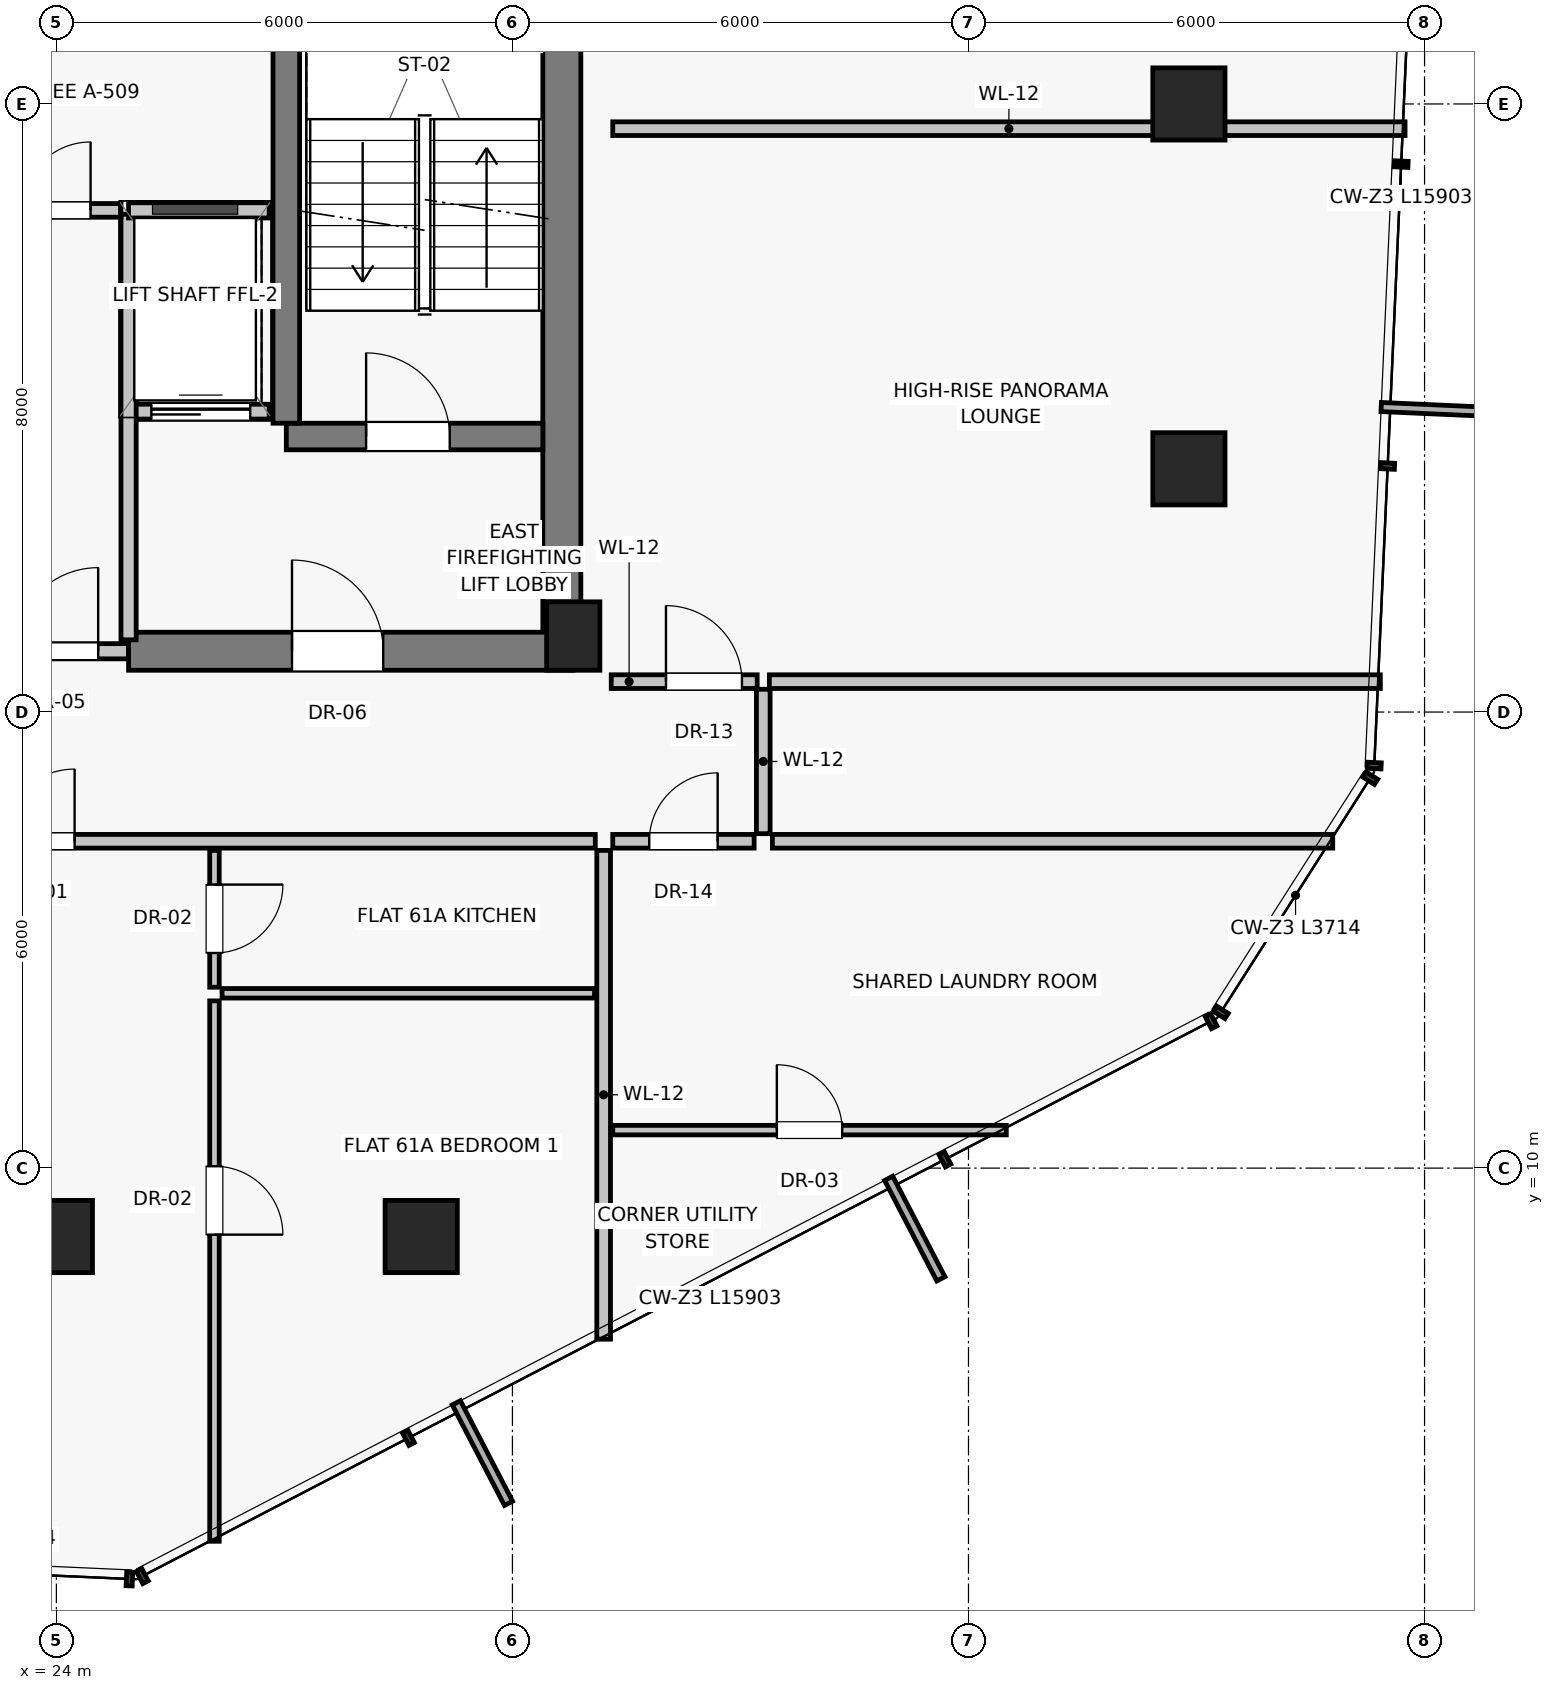
"""IFC4 building model, lengths in metres.
Left out: names, types, materials, properties, quantities, classifications, styles, units other than length and angle.
Written with IfcOpenShell. Run it as: python <this file> out.ifc"""

import sys

from ifc_helpers import new_model, si_unit, direction, frame, frame_2d, origin, origin_2d, place, context, subcontext, project, spatial, rectangle, extrude, source, transform, mapped, element, fill, save


model = new_model("IFC4")
c1 = context("Model", 3, precision=1e-05, world=origin(), true_north=direction((0.0, 1.0)))
c2 = subcontext(c1, "Body", "Model", "MODEL_VIEW")
j1 = project(units=[si_unit("LENGTHUNIT", "METRE"), si_unit("PLANEANGLEUNIT", "RADIAN")], contexts=[c1])
p1 = place(None, origin())
s1 = spatial("IfcSite", under=j1, at=p1, CompositionType="ELEMENT")
p2 = place(p1, origin())
s2 = spatial("IfcBuilding", under=s1, at=p2, CompositionType="ELEMENT")
p3 = place(p2, frame((0.0, 0.0, 215.65)))
s3 = spatial("IfcBuildingStorey", under=s2, at=p3, CompositionType="ELEMENT", Elevation=215.65)
p4 = place(p3, frame((30.8, 17.0, 0.0), z_axis=(0.0, 0.0, 1.0), x_axis=(1.0, 0.0, 0.0)))
e1 = element("IfcColumn", 1, at=p4, inside=s3, PredefinedType="PILASTER", context=c2, shape_type="SweptSolid", body=[
    extrude(rectangle(XDim=0.7, YDim=0.9, at=origin_2d()), origin(), (0.0, 0.0, 1.0), 3.25),
])
for number, where, z_axis, x_axis in (
    (2, (38.9, 19.2, 0.0), (0.0, 0.0, 1.0), (1.0, 0.0, 0.0)),
    (3, (38.9, 24.0, 0.0), (0.0, 0.0, 1.0), (1.0, 0.0, 0.0)),
    (4, (24.0, 9.1, 0.0), (0.0, 0.0, 1.0), (1.0, 0.0, 0.0)),
    (5, (28.8, 9.1, 0.0), (0.0, 0.0, 1.0), (1.0, 0.0, 0.0)),
):
    element("IfcColumn", number, at=place(p3, frame(where, z_axis=z_axis, x_axis=x_axis)), inside=s3, PredefinedType="COLUMN", context=c2, shape_type="SweptSolid", body=[
        extrude(rectangle(XDim=0.95, YDim=0.95, at=origin_2d()), origin(), (0.0, 0.0, 1.0), 3.25),
    ])
p5 = place(p3, frame((30.65, 16.8, 0.0), z_axis=(0.0, 0.0, 1.0), x_axis=(0.0, 1.0, 0.0)))
e6 = element("IfcWall", 6, at=p5, inside=s3, PredefinedType="SHEAR", context=c2, shape_type="SweptSolid", body=[
    extrude(rectangle(XDim=14.2, YDim=0.5, at=frame_2d((7.1, 0.0))), origin(), (0.0, 0.0, 1.0), 3.015),
])
p6 = place(p3, frame((23.05, 16.8, 0.0), z_axis=(0.0, 0.0, 1.0), x_axis=(1.0, 0.0, 0.0)))
e7 = element("IfcWall", 7, at=p6, inside=s3, PredefinedType="SOLIDWALL", context=c2, shape_type="SweptSolid", body=[
    extrude(rectangle(XDim=1.9, YDim=0.2, at=frame_2d((0.95, 0.0))), origin(), (0.0, 0.0, 1.0), 2.165),
])
p7 = place(p6, frame((0.4, 0.0, 0.0)))
e8 = element("IfcOpeningElement", 8, at=p7, cuts=e7, PredefinedType="OPENING", context=c2, shape_type="SweptSolid", body=[
    extrude(rectangle(XDim=1.1, YDim=2.03, at=frame_2d((0.55, 1.015))), frame((0.0, 0.11, 0.0), z_axis=(0.0, -1.0, 0.0), x_axis=(1.0, 0.0, 0.0)), (0.0, 0.0, 1.0), 0.22),
])
p8 = place(p3, frame((24.95, 16.8, 0.0), z_axis=(0.0, 0.0, 1.0), x_axis=(1.0, 0.0, 0.0)))
e9 = element("IfcWall", 9, at=p8, inside=s3, PredefinedType="SHEAR", context=c2, shape_type="SweptSolid", body=[
    extrude(rectangle(XDim=5.85, YDim=0.5, at=frame_2d((2.925, 0.0))), origin(), (0.0, 0.0, 1.0), 3.015),
])
p9 = place(p8, frame((2.15, 0.0, 0.0)))
e10 = element("IfcOpeningElement", 10, at=p9, cuts=e9, PredefinedType="OPENING", context=c2, shape_type="SweptSolid", body=[
    extrude(rectangle(XDim=1.2, YDim=2.03, at=frame_2d((0.6, 1.015))), frame((0.0, 0.26, 0.0), z_axis=(0.0, -1.0, 0.0), x_axis=(1.0, 0.0, 0.0)), (0.0, 0.0, 1.0), 0.52),
])
p10 = place(p3, frame((24.95, 19.95, 0.0), z_axis=(0.0, 0.0, 1.0), x_axis=(1.0, 0.0, 0.0)))
e11 = element("IfcWall", 11, at=p10, inside=s3, PredefinedType="SOLIDWALL", context=c2, shape_type="SweptSolid", body=[
    extrude(rectangle(XDim=1.85, YDim=0.2, at=frame_2d((0.925, 0.0))), origin(), (0.0, 0.0, 1.0), 3.015),
])
p11 = place(p10, frame((0.3, 0.0, 0.0)))
e12 = element("IfcOpeningElement", 12, at=p11, cuts=e11, PredefinedType="OPENING", context=c2, shape_type="SweptSolid", body=[
    extrude(rectangle(XDim=1.3, YDim=2.25, at=frame_2d((0.65, 1.125))), frame((0.0, 0.11, 0.0), z_axis=(0.0, -1.0, 0.0), x_axis=(1.0, 0.0, 0.0)), (0.0, 0.0, 1.0), 0.22),
])
p12 = place(p3, frame((27.025, 19.625, 0.0), z_axis=(0.0, 0.0, 1.0), x_axis=(1.0, 0.0, 0.0)))
e13 = element("IfcWall", 13, at=p12, inside=s3, PredefinedType="SHEAR", context=c2, shape_type="SweptSolid", body=[
    extrude(rectangle(XDim=3.375, YDim=0.35, at=frame_2d((1.688, 0.0))), origin(), (0.0, 0.0, 1.0), 3.015),
])
p13 = place(p12, frame((1.05, 0.0, 0.0)))
e14 = element("IfcOpeningElement", 14, at=p13, cuts=e13, PredefinedType="OPENING", context=c2, shape_type="SweptSolid", body=[
    extrude(rectangle(XDim=1.1, YDim=2.03, at=frame_2d((0.55, 1.015))), frame((0.0, 0.185, 0.0), z_axis=(0.0, -1.0, 0.0), x_axis=(1.0, 0.0, 0.0)), (0.0, 0.0, 1.0), 0.37),
])
p14 = place(p3, frame((27.025, 19.8, 0.0), z_axis=(0.0, 0.0, 1.0), x_axis=(0.0, 1.0, 0.0)))
e15 = element("IfcWall", 15, at=p14, inside=s3, PredefinedType="SHEAR", context=c2, shape_type="SweptSolid", body=[
    extrude(rectangle(XDim=8.775, YDim=0.35, at=frame_2d((4.387, 0.0))), origin(), (0.0, 0.0, 1.0), 3.015),
])
p15 = place(p3, frame((24.95, 16.95, 0.0), z_axis=(0.0, 0.0, 1.0), x_axis=(0.0, 1.0, 0.0)))
e16 = element("IfcWall", 16, at=p15, inside=s3, PredefinedType="SOLIDWALL", context=c2, shape_type="SweptSolid", body=[
    extrude(rectangle(XDim=5.6, YDim=0.2, at=frame_2d((2.8, 0.0))), origin(), (0.0, 0.0, 1.0), 3.015),
])
p16 = place(p3, frame((24.95, 22.6, 0.0), z_axis=(0.0, 0.0, 1.0), x_axis=(1.0, 0.0, 0.0)))
e17 = element("IfcWall", 17, at=p16, inside=s3, PredefinedType="SOLIDWALL", context=c2, shape_type="SweptSolid", body=[
    extrude(rectangle(XDim=1.85, YDim=0.2, at=frame_2d((0.925, 0.0))), origin(), (0.0, 0.0, 1.0), 3.015),
])
p17 = place(p3, frame((23.15, 22.6, 0.0), z_axis=(0.0, 0.0, 1.0), x_axis=(1.0, 0.0, 0.0)))
e18 = element("IfcWall", 18, at=p17, inside=s3, PredefinedType="PARTITIONING", context=c2, shape_type="SweptSolid", body=[
    extrude(rectangle(XDim=1.7, YDim=0.18, at=frame_2d((0.85, 0.0))), origin(), (0.0, 0.0, 1.0), 3.015),
])
p18 = place(p17, frame((0.4, 0.0, 0.0)))
e19 = element("IfcOpeningElement", 19, at=p18, cuts=e18, PredefinedType="OPENING", context=c2, shape_type="SweptSolid", body=[
    extrude(rectangle(XDim=0.9, YDim=2.01, at=frame_2d((0.45, 1.005))), frame((0.0, 0.1, 0.0), z_axis=(0.0, -1.0, 0.0), x_axis=(1.0, 0.0, 0.0)), (0.0, 0.0, 1.0), 0.2),
])
p19 = place(p3, frame((31.2, 14.18, 0.0), z_axis=(0.0, 0.0, 1.0), x_axis=(0.0, -1.0, 0.0)))
e20 = element("IfcWall", 20, at=p19, inside=s3, PredefinedType="PARTITIONING", context=c2, shape_type="SweptSolid", body=[
    extrude(rectangle(XDim=6.43, YDim=0.18, at=frame_2d((3.215, 0.0))), origin(), (0.0, 0.0, 1.0), 3.015),
])
p20 = place(p3, frame((19.31, 14.3, 0.0), z_axis=(0.0, 0.0, 1.0), x_axis=(1.0, 0.0, 0.0)))
e21 = element("IfcWall", 21, at=p20, inside=s3, PredefinedType="PARTITIONING", context=c2, shape_type="SweptSolid", body=[
    extrude(rectangle(XDim=11.78, YDim=0.18, at=frame_2d((5.89, 0.0))), origin(), (0.0, 0.0, 1.0), 3.015),
])
p21 = place(p20, frame((3.98, 0.0, 0.0)))
e22 = element("IfcOpeningElement", 22, at=p21, cuts=e21, PredefinedType="OPENING", context=c2, shape_type="SweptSolid", body=[
    extrude(rectangle(XDim=0.95, YDim=2.02, at=frame_2d((0.475, 1.01))), frame((0.0, 0.1, 0.0), z_axis=(0.0, -1.0, 0.0), x_axis=(1.0, 0.0, 0.0)), (0.0, 0.0, 1.0), 0.2),
])
p22 = place(p3, frame((26.08, 14.18, 0.0), z_axis=(0.0, 0.0, 1.0), x_axis=(0.0, -1.0, 0.0)))
e23 = element("IfcWall", 23, at=p22, inside=s3, PredefinedType="PARTITIONING", context=c2, shape_type="SweptSolid", body=[
    extrude(rectangle(XDim=1.8, YDim=0.125, at=frame_2d((0.9, 0.0))), origin(), (0.0, 0.0, 1.0), 3.015),
])
p23 = place(p22, frame((0.45, 0.0, 0.0)))
e24 = element("IfcOpeningElement", 24, at=p23, cuts=e23, PredefinedType="OPENING", context=c2, shape_type="SweptSolid", body=[
    extrude(rectangle(XDim=0.9, YDim=2.01, at=frame_2d((0.45, 1.005))), frame((0.0, 0.073, 0.0), z_axis=(0.0, -1.0, 0.0), x_axis=(1.0, 0.0, 0.0)), (0.0, 0.0, 1.0), 0.145),
])
p24 = place(p3, frame((26.18, 12.3, 0.0), z_axis=(0.0, 0.0, 1.0), x_axis=(1.0, 0.0, 0.0)))
e25 = element("IfcWall", 25, at=p24, inside=s3, PredefinedType="PARTITIONING", context=c2, shape_type="SweptSolid", body=[
    extrude(rectangle(XDim=4.9, YDim=0.125, at=frame_2d((2.45, 0.0))), origin(), (0.0, 0.0, 1.0), 3.015),
])
p25 = place(p3, frame((26.08, 12.2, 0.0), z_axis=(0.0, 0.0, 1.0), x_axis=(0.0, -1.0, 0.0)))
e26 = element("IfcWall", 26, at=p25, inside=s3, PredefinedType="PARTITIONING", context=c2, shape_type="SweptSolid", body=[
    extrude(rectangle(XDim=7.109, YDim=0.125, at=frame_2d((3.555, 0.0))), origin(), (0.0, 0.0, 1.0), 3.015),
])
p26 = place(p25, frame((2.175, 0.0, 0.0)))
e27 = element("IfcOpeningElement", 27, at=p26, cuts=e26, PredefinedType="OPENING", context=c2, shape_type="SweptSolid", body=[
    extrude(rectangle(XDim=0.9, YDim=2.01, at=frame_2d((0.45, 1.005))), frame((0.0, 0.073, 0.0), z_axis=(0.0, -1.0, 0.0), x_axis=(1.0, 0.0, 0.0)), (0.0, 0.0, 1.0), 0.145),
])
p27 = place(p3, frame((31.32, 23.675, 0.0), z_axis=(0.0, 0.0, 1.0), x_axis=(1.0, 0.0, 0.0)))
e28 = element("IfcWall", 28, at=p27, inside=s3, PredefinedType="PARTITIONING", context=c2, shape_type="SweptSolid", body=[
    extrude(rectangle(XDim=10.423, YDim=0.18, at=frame_2d((5.212, 0.0))), origin(), (0.0, 0.0, 1.0), 3.015),
])
p28 = place(p3, frame((33.3, 14.4, 0.0), z_axis=(0.0, 0.0, 1.0), x_axis=(0.0, 1.0, 0.0)))
e29 = element("IfcWall", 29, at=p28, inside=s3, PredefinedType="PARTITIONING", context=c2, shape_type="SweptSolid", body=[
    extrude(rectangle(XDim=1.9, YDim=0.18, at=frame_2d((0.95, 0.0))), origin(), (0.0, 0.0, 1.0), 3.015),
])
p29 = place(p3, frame((31.3, 16.4, 0.0), z_axis=(0.0, 0.0, 1.0), x_axis=(1.0, 0.0, 0.0)))
e30 = element("IfcWall", 30, at=p29, inside=s3, PredefinedType="PARTITIONING", context=c2, shape_type="SweptSolid", body=[
    extrude(rectangle(XDim=1.92, YDim=0.18, at=frame_2d((0.96, 0.0))), origin(), (0.0, 0.0, 1.0), 3.015),
])
p30 = place(p29, frame((0.72, 0.0, 0.0)))
e31 = element("IfcOpeningElement", 31, at=p30, cuts=e30, PredefinedType="OPENING", context=c2, shape_type="SweptSolid", body=[
    extrude(rectangle(XDim=1.0, YDim=2.01, at=frame_2d((0.5, 1.005))), frame((0.0, 0.1, 0.0), z_axis=(0.0, -1.0, 0.0), x_axis=(1.0, 0.0, 0.0)), (0.0, 0.0, 1.0), 0.2),
])
p31 = place(p3, frame((33.38, 16.4, 0.0), z_axis=(0.0, 0.0, 1.0), x_axis=(1.0, 0.0, 0.0)))
e32 = element("IfcWall", 32, at=p31, inside=s3, PredefinedType="PARTITIONING", context=c2, shape_type="SweptSolid", body=[
    extrude(rectangle(XDim=8.038, YDim=0.18, at=frame_2d((4.019, 0.0))), origin(), (0.0, 0.0, 1.0), 3.015),
])
p32 = place(p3, frame((33.42, 14.3, 0.0), z_axis=(0.0, 0.0, 1.0), x_axis=(1.0, 0.0, 0.0)))
e33 = element("IfcWall", 33, at=p32, inside=s3, PredefinedType="PARTITIONING", context=c2, shape_type="SweptSolid", body=[
    extrude(rectangle(XDim=7.372, YDim=0.18, at=frame_2d((3.686, 0.0))), origin(), (0.0, 0.0, 1.0), 3.015),
])
p33 = place(p3, frame((31.32, 14.3, 0.0), z_axis=(0.0, 0.0, 1.0), x_axis=(1.0, 0.0, 0.0)))
e34 = element("IfcWall", 34, at=p33, inside=s3, PredefinedType="PARTITIONING", context=c2, shape_type="SweptSolid", body=[
    extrude(rectangle(XDim=1.86, YDim=0.18, at=frame_2d((0.93, 0.0))), origin(), (0.0, 0.0, 1.0), 3.015),
])
p34 = place(p33, frame((0.48, 0.0, 0.0)))
e35 = element("IfcOpeningElement", 35, at=p34, cuts=e34, PredefinedType="OPENING", context=c2, shape_type="SweptSolid", body=[
    extrude(rectangle(XDim=0.9, YDim=2.01, at=frame_2d((0.45, 1.005))), frame((0.0, 0.1, 0.0), z_axis=(0.0, -1.0, 0.0), x_axis=(1.0, 0.0, 0.0)), (0.0, 0.0, 1.0), 0.2),
])
p35 = place(p3, frame((31.32, 10.5, 0.0), z_axis=(0.0, 0.0, 1.0), x_axis=(1.0, 0.0, 0.0)))
e36 = element("IfcWall", 36, at=p35, inside=s3, PredefinedType="PARTITIONING", context=c2, shape_type="SweptSolid", body=[
    extrude(rectangle(XDim=5.177, YDim=0.125, at=frame_2d((2.589, 0.0))), origin(), (0.0, 0.0, 1.0), 3.015),
])
p36 = place(p35, frame((2.159, 0.0, 0.0)))
e37 = element("IfcOpeningElement", 37, at=p36, cuts=e36, PredefinedType="OPENING", context=c2, shape_type="SweptSolid", body=[
    extrude(rectangle(XDim=0.86, YDim=2.01, at=frame_2d((0.43, 1.005))), frame((0.0, 0.073, 0.0), z_axis=(0.0, -1.0, 0.0), x_axis=(1.0, 0.0, 0.0)), (0.0, 0.0, 1.0), 0.145),
])
m1 = source(origin(), c2, "Body", "SweptSolid", [
    extrude(rectangle(XDim=1.1, YDim=2.03, at=frame_2d((0.55, 1.015))), frame((0.0, 0.025, 0.0), z_axis=(0.0, -1.0, 0.0), x_axis=(1.0, 0.0, 0.0)), (0.0, 0.0, 1.0), 0.05),
])
p37 = place(p7, origin())
e38 = element("IfcDoor", 38, at=p37, inside=s3, OperationType="SINGLE_SWING_RIGHT", PredefinedType="DOOR", context=c2, shape_type="MappedRepresentation", body=[
    mapped(m1, transform((0.0, 0.0, 0.0), scale=1.0)),
])
fill(e8, e38)
m2 = source(origin(), c2, "Body", "SweptSolid", [
    extrude(rectangle(XDim=1.2, YDim=2.03, at=frame_2d((0.6, 1.015))), frame((0.0, 0.025, 0.0), z_axis=(0.0, -1.0, 0.0), x_axis=(1.0, 0.0, 0.0)), (0.0, 0.0, 1.0), 0.05),
])
p38 = place(p9, origin())
e39 = element("IfcDoor", 39, at=p38, inside=s3, OperationType="SINGLE_SWING_LEFT", PredefinedType="DOOR", context=c2, shape_type="MappedRepresentation", body=[
    mapped(m2, transform((0.0, 0.0, 0.0), scale=1.0)),
])
fill(e10, e39)
m3 = source(origin(), c2, "Body", "SweptSolid", [
    extrude(rectangle(XDim=1.3, YDim=2.25, at=frame_2d((0.65, 1.125))), frame((0.0, 0.025, 0.0), z_axis=(0.0, -1.0, 0.0), x_axis=(1.0, 0.0, 0.0)), (0.0, 0.0, 1.0), 0.05),
])
p39 = place(p11, origin())
e40 = element("IfcDoor", 40, at=p39, inside=s3, OperationType="SLIDING_TO_LEFT", PredefinedType="DOOR", context=c2, shape_type="MappedRepresentation", body=[
    mapped(m3, transform((0.0, 0.0, 0.0), scale=1.0)),
])
fill(e12, e40)
p40 = place(p13, origin())
e41 = element("IfcDoor", 41, at=p40, inside=s3, OperationType="SINGLE_SWING_LEFT", PredefinedType="DOOR", context=c2, shape_type="MappedRepresentation", body=[
    mapped(m1, transform((0.0, 0.0, 0.0), scale=1.0)),
])
fill(e14, e41)
m4 = source(origin(), c2, "Body", "SweptSolid", [
    extrude(rectangle(XDim=0.9, YDim=2.01, at=frame_2d((0.45, 1.005))), frame((0.0, 0.025, 0.0), z_axis=(0.0, -1.0, 0.0), x_axis=(1.0, 0.0, 0.0)), (0.0, 0.0, 1.0), 0.05),
])
p41 = place(p18, origin())
e42 = element("IfcDoor", 42, at=p41, inside=s3, OperationType="SINGLE_SWING_RIGHT", PredefinedType="DOOR", context=c2, shape_type="MappedRepresentation", body=[
    mapped(m4, transform((0.0, 0.0, 0.0), scale=1.0)),
])
fill(e19, e42)
m5 = source(origin(), c2, "Body", "SweptSolid", [
    extrude(rectangle(XDim=0.95, YDim=2.02, at=frame_2d((0.475, 1.01))), frame((0.0, 0.025, 0.0), z_axis=(0.0, -1.0, 0.0), x_axis=(1.0, 0.0, 0.0)), (0.0, 0.0, 1.0), 0.05),
])
p42 = place(p21, origin())
e43 = element("IfcDoor", 43, at=p42, inside=s3, OperationType="SINGLE_SWING_RIGHT", PredefinedType="DOOR", context=c2, shape_type="MappedRepresentation", body=[
    mapped(m5, transform((0.0, 0.0, 0.0), scale=1.0)),
])
fill(e22, e43)
p43 = place(p23, origin())
e44 = element("IfcDoor", 44, at=p43, inside=s3, OperationType="SINGLE_SWING_LEFT", PredefinedType="DOOR", context=c2, shape_type="MappedRepresentation", body=[
    mapped(m4, transform((0.0, 0.0, 0.0), scale=1.0)),
])
fill(e24, e44)
p44 = place(p26, origin())
e45 = element("IfcDoor", 45, at=p44, inside=s3, OperationType="SINGLE_SWING_RIGHT", PredefinedType="DOOR", context=c2, shape_type="MappedRepresentation", body=[
    mapped(m4, transform((0.0, 0.0, 0.0), scale=1.0)),
])
fill(e27, e45)
m6 = source(origin(), c2, "Body", "SweptSolid", [
    extrude(rectangle(XDim=1.0, YDim=2.01, at=frame_2d((0.5, 1.005))), frame((0.0, 0.025, 0.0), z_axis=(0.0, -1.0, 0.0), x_axis=(1.0, 0.0, 0.0)), (0.0, 0.0, 1.0), 0.05),
])
p45 = place(p30, origin())
e46 = element("IfcDoor", 46, at=p45, inside=s3, OperationType="SINGLE_SWING_LEFT", PredefinedType="DOOR", context=c2, shape_type="MappedRepresentation", body=[
    mapped(m6, transform((0.0, 0.0, 0.0), scale=1.0)),
])
fill(e31, e46)
p46 = place(p34, origin())
e47 = element("IfcDoor", 47, at=p46, inside=s3, OperationType="SINGLE_SWING_RIGHT", PredefinedType="DOOR", context=c2, shape_type="MappedRepresentation", body=[
    mapped(m4, transform((0.0, 0.0, 0.0), scale=1.0)),
])
fill(e35, e47)
m7 = source(origin(), c2, "Body", "SweptSolid", [
    extrude(rectangle(XDim=0.86, YDim=2.01, at=frame_2d((0.43, 1.005))), frame((0.0, 0.025, 0.0), z_axis=(0.0, -1.0, 0.0), x_axis=(1.0, 0.0, 0.0)), (0.0, 0.0, 1.0), 0.05),
])
p47 = place(p36, origin())
e48 = element("IfcDoor", 48, at=p47, inside=s3, OperationType="SINGLE_SWING_LEFT", PredefinedType="DOOR", context=c2, shape_type="MappedRepresentation", body=[
    mapped(m7, transform((0.0, 0.0, 0.0), scale=1.0)),
])
fill(e37, e48)
save(model, sys.argv[1])
